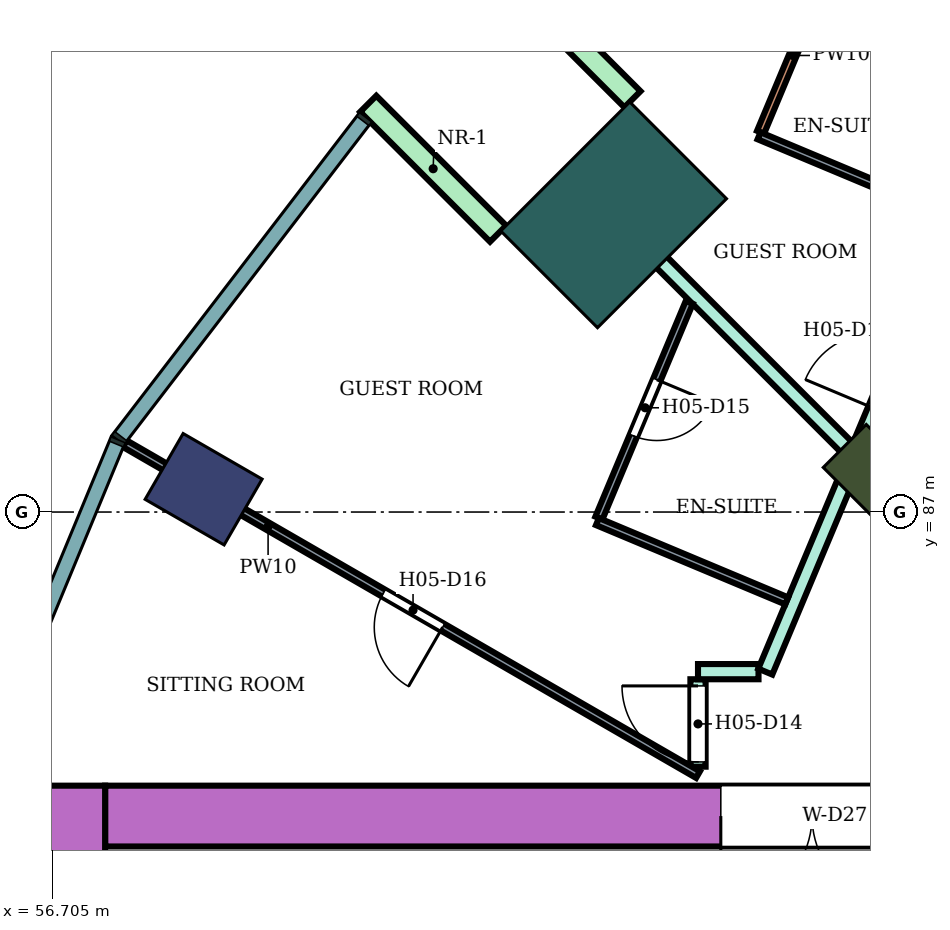
"""IFC4 building model, lengths in metres.
Left out: names, types, materials, properties, quantities, classifications, styles, units other than length and angle.
Written with IfcOpenShell. Run it as: python <this file> out.ifc"""

import sys

from ifc_helpers import new_model, si_unit, direction, frame, frame_2d, origin, origin_2d, place, context, subcontext, project, spatial, rectangle, extrude, element, fill, save


model = new_model("IFC4")
c1 = context("Model", 3, precision=1e-05, world=origin(), true_north=direction((0.0, 1.0)))
c2 = subcontext(c1, "Body", "Model", "MODEL_VIEW")
j1 = project(units=[si_unit("LENGTHUNIT", "METRE"), si_unit("PLANEANGLEUNIT", "RADIAN")], contexts=[c1])
p1 = place(None, origin())
s1 = spatial("IfcSite", under=j1, at=p1, CompositionType="ELEMENT")
p2 = place(p1, origin())
s2 = spatial("IfcBuilding", under=s1, at=p2, CompositionType="ELEMENT")
p3 = place(p2, frame((0.0, 0.0, 86.2)))
s3 = spatial("IfcBuildingStorey", under=s2, at=p3, CompositionType="ELEMENT", Elevation=86.2)
p4 = place(p3, frame((58.696, 87.3, 0.0), z_axis=(0.0, 0.0, 1.0), x_axis=(-0.866025403784, 0.5, 0.0)))
e1 = element("IfcColumn", 1, at=p4, inside=s3, PredefinedType="COLUMN", context=c2, shape_type="SweptSolid", body=[
    extrude(rectangle(XDim=1.2, YDim=1.0, at=origin_2d()), origin(), (0.0, 0.0, 1.0), 3.8),
])
p5 = place(p3, frame((67.555, 87.445, 0.0), z_axis=(0.0, 0.0, 1.0), x_axis=(-0.707106781187, 0.707106781187, 0.0)))
e2 = element("IfcColumn", 2, at=p5, inside=s3, PredefinedType="COLUMN", context=c2, shape_type="SweptSolid", body=[
    extrude(rectangle(XDim=1.2, YDim=0.8, at=origin_2d()), origin(), (0.0, 0.0, 1.0), 3.8),
])
p6 = place(p3, frame((64.09, 90.91, 0.0), z_axis=(0.0, 0.0, 1.0), x_axis=(-0.707106781187, 0.707106781187, 0.0)))
e3 = element("IfcColumn", 3, at=p6, inside=s3, PredefinedType="COLUMN", context=c2, shape_type="SweptSolid", body=[
    extrude(rectangle(XDim=1.8, YDim=2.4, at=origin_2d()), origin(), (0.0, 0.0, 1.0), 3.8),
])
p7 = place(p3, frame((72.1, 83.0, 0.0), z_axis=(0.0, 0.0, 1.0), x_axis=(-1.0, 0.0, 0.0)))
e4 = element("IfcWall", 4, at=p7, inside=s3, PredefinedType="SHEAR", context=c2, shape_type="SweptSolid", body=[
    extrude(rectangle(XDim=14.7, YDim=0.8, at=frame_2d((7.35, 0.0))), origin(), (0.0, 0.0, 1.0), 3.48),
])
p8 = place(p7, frame((4.2, 0.0, 0.0)))
e5 = element("IfcOpeningElement", 5, at=p8, cuts=e4, PredefinedType="OPENING", context=c2, shape_type="SweptSolid", body=[
    extrude(rectangle(XDim=2.4, YDim=2.4, at=frame_2d((1.2, 1.2))), frame((0.0, 0.41, 0.0), z_axis=(0.0, -1.0, 0.0), x_axis=(1.0, 0.0, 0.0)), (0.0, 0.0, 1.0), 0.82),
])
p9 = place(p3, frame((57.0, 83.4, 0.0), z_axis=(0.0, 0.0, 1.0), x_axis=(0.0, -1.0, 0.0)))
e6 = element("IfcWall", 6, at=p9, inside=s3, PredefinedType="SHEAR", context=c2, shape_type="SweptSolid", body=[
    extrude(rectangle(XDim=16.8, YDim=0.8, at=frame_2d((8.4, 0.0))), origin(), (0.0, 0.0, 1.0), 3.48),
])
for number, where, z_axis, x_axis in (
    (7, (64.338, 92.43, 0.0), (0.0, 0.0, 1.0), (-0.707, 0.707, 0.0)),
    (8, (62.57, 90.662, 0.0), (0.0, 0.0, 1.0), (-0.707, 0.707, 0.0)),
):
    element("IfcWall", number, at=place(p3, frame(where, z_axis=z_axis, x_axis=x_axis)), inside=s3, PredefinedType="NOTDEFINED", context=c2, shape_type="SweptSolid", body=[
        extrude(rectangle(XDim=2.416, YDim=0.3, at=frame_2d((1.208, 0.0))), origin(), (0.0, 0.0, 1.0), 3.8),
    ])
p10 = place(p3, frame((63.6, 91.409, 0.0), z_axis=(0.0, 0.0, 1.0), x_axis=(0.70693749829, -0.707276023566, 0.0)))
e9 = element("IfcWall", 9, at=p10, inside=s3, PredefinedType="PARTITIONING", context=c2, shape_type="SweptSolid", body=[
    extrude(rectangle(XDim=5.048, YDim=0.2, at=frame_2d((2.524, 0.0))), origin(), (0.0, 0.0, 1.0), 3.35),
])
p11 = place(p3, frame((65.2, 83.65, 0.0), z_axis=(0.0, 0.0, 1.0), x_axis=(0.0, 1.0, 0.0)))
e10 = element("IfcWall", 10, at=p11, inside=s3, PredefinedType="PARTITIONING", context=c2, shape_type="SweptSolid", body=[
    extrude(rectangle(XDim=1.15, YDim=0.2, at=frame_2d((0.575, 0.0))), origin(), (0.0, 0.0, 1.0), 3.35),
])
p12 = place(p11, frame((0.062, 0.0, 0.0)))
e11 = element("IfcOpeningElement", 11, at=p12, cuts=e10, PredefinedType="OPENING", context=c2, shape_type="SweptSolid", body=[
    extrude(rectangle(XDim=1.0, YDim=2.1, at=frame_2d((0.5, 1.05))), frame((0.0, 0.11, 0.0), z_axis=(0.0, -1.0, 0.0), x_axis=(1.0, 0.0, 0.0)), (0.0, 0.0, 1.0), 0.22),
])
p13 = place(p3, frame((65.2, 84.9, 0.0), z_axis=(0.0, 0.0, 1.0), x_axis=(1.0, 0.0, 0.0)))
e12 = element("IfcWall", 12, at=p13, inside=s3, PredefinedType="PARTITIONING", context=c2, shape_type="SweptSolid", body=[
    extrude(rectangle(XDim=0.796, YDim=0.2, at=frame_2d((0.398, 0.0))), origin(), (0.0, 0.0, 1.0), 3.35),
])
p14 = place(p3, frame((66.085, 84.9, 0.0), z_axis=(0.0, 0.0, 1.0), x_axis=(0.386676248006, 0.922215527536, 0.0)))
e13 = element("IfcWall", 13, at=p14, inside=s3, PredefinedType="PARTITIONING", context=c2, shape_type="SweptSolid", body=[
    extrude(rectangle(XDim=8.5, YDim=0.2, at=frame_2d((4.25, 0.0))), origin(), (0.0, 0.0, 1.0), 3.35),
])
p15 = place(p14, frame((3.748, 0.0, 0.0)))
e14 = element("IfcOpeningElement", 14, at=p15, cuts=e13, PredefinedType="OPENING", context=c2, shape_type="SweptSolid", body=[
    extrude(rectangle(XDim=1.0, YDim=2.1, at=frame_2d((0.5, 1.05))), frame((0.0, 0.11, 0.0), z_axis=(0.0, -1.0, 0.0), x_axis=(1.0, 0.0, 0.0)), (0.0, 0.0, 1.0), 0.22),
])
p16 = place(p3, frame((67.104, 97.343, 0.0), z_axis=(0.0, 0.0, 1.0), x_axis=(0.499799615385, -0.866141064989, 0.0)))
e15 = element("IfcWall", 15, at=p16, inside=s3, PredefinedType="PARTITIONING", context=c2, shape_type="SweptSolid", body=[
    extrude(rectangle(XDim=5.021, YDim=0.2, at=frame_2d((2.511, 0.0))), origin(), (0.0, 0.0, 1.0), 3.35),
])
p17 = place(p3, frame((57.659, 87.899, 0.0), z_axis=(0.0, 0.0, 1.0), x_axis=(0.86602264145, -0.500004784474, 0.0)))
e16 = element("IfcWall", 16, at=p17, inside=s3, PredefinedType="PARTITIONING", context=c2, shape_type="SweptSolid", body=[
    extrude(rectangle(XDim=8.708, YDim=0.1, at=frame_2d((4.354, 0.0))), origin(), (0.0, 0.0, 1.0), 3.35),
])
p18 = place(p17, frame((3.929, 0.0, 0.0)))
e17 = element("IfcOpeningElement", 17, at=p18, cuts=e16, PredefinedType="OPENING", context=c2, shape_type="SweptSolid", body=[
    extrude(rectangle(XDim=0.9, YDim=2.1, at=frame_2d((0.45, 1.05))), frame((0.0, 0.06, 0.0), z_axis=(0.0, -1.0, 0.0), x_axis=(1.0, 0.0, 0.0)), (0.0, 0.0, 1.0), 0.12),
])
p19 = place(p3, frame((63.896, 86.92, 0.0), z_axis=(0.0, 0.0, 1.0), x_axis=(0.386485049699, 0.922295671875, 0.0)))
e18 = element("IfcWall", 18, at=p19, inside=s3, PredefinedType="PARTITIONING", context=c2, shape_type="SweptSolid", body=[
    extrude(rectangle(XDim=3.077, YDim=0.1, at=frame_2d((1.539, 0.0))), origin(), (0.0, 0.0, 1.0), 3.35),
])
p20 = place(p19, frame((1.174, 0.0, 0.0)))
e19 = element("IfcOpeningElement", 19, at=p20, cuts=e18, PredefinedType="OPENING", context=c2, shape_type="SweptSolid", body=[
    extrude(rectangle(XDim=0.8, YDim=2.1, at=frame_2d((0.4, 1.05))), frame((0.0, 0.06, 0.0), z_axis=(0.0, -1.0, 0.0), x_axis=(1.0, 0.0, 0.0)), (0.0, 0.0, 1.0), 0.12),
])
p21 = place(p3, frame((63.877, 86.874, 0.0), z_axis=(0.0, 0.0, 1.0), x_axis=(0.922350337209, -0.386354572188, 0.0)))
e20 = element("IfcWall", 20, at=p21, inside=s3, PredefinedType="PARTITIONING", context=c2, shape_type="SweptSolid", body=[
    extrude(rectangle(XDim=2.7, YDim=0.1, at=frame_2d((1.35, 0.0))), origin(), (0.0, 0.0, 1.0), 3.35),
])
p22 = place(p3, frame((66.023, 91.996, 0.0), z_axis=(0.0, 0.0, 1.0), x_axis=(0.386497426192, 0.922290485447, 0.0)))
e21 = element("IfcWall", 21, at=p22, inside=s3, PredefinedType="PARTITIONING", context=c2, shape_type="SweptSolid", body=[
    extrude(rectangle(XDim=4.383, YDim=0.1, at=frame_2d((2.191, 0.0))), origin(), (0.0, 0.0, 1.0), 2.58),
])
p23 = place(p22, frame((1.841, 0.0, 0.0)))
e22 = element("IfcOpeningElement", 22, at=p23, cuts=e21, PredefinedType="OPENING", context=c2, shape_type="SweptSolid", body=[
    extrude(rectangle(XDim=0.8, YDim=2.1, at=frame_2d((0.4, 1.05))), frame((0.0, 0.06, 0.0), z_axis=(0.0, -1.0, 0.0), x_axis=(1.0, 0.0, 0.0)), (0.0, 0.0, 1.0), 0.12),
])
p24 = place(p3, frame((66.003, 91.95, 0.0), z_axis=(0.0, 0.0, 1.0), x_axis=(0.922350337209, -0.386354572188, 0.0)))
e23 = element("IfcWall", 23, at=p24, inside=s3, PredefinedType="PARTITIONING", context=c2, shape_type="SweptSolid", body=[
    extrude(rectangle(XDim=2.7, YDim=0.1, at=frame_2d((1.35, 0.0))), origin(), (0.0, 0.0, 1.0), 3.35),
])
p25 = place(p12, origin())
e24 = element("IfcDoor", 24, at=p25, inside=s3, OperationType="SINGLE_SWING_RIGHT", PredefinedType="DOOR", context=c2, shape_type="SweptSolid", body=[
    extrude(rectangle(XDim=1.0, YDim=2.1, at=frame_2d((0.5, 1.05))), frame((0.0, 0.025, 0.0), z_axis=(0.0, -1.0, 0.0), x_axis=(1.0, 0.0, 0.0)), (0.0, 0.0, 1.0), 0.05),
])
fill(e11, e24)
p26 = place(p20, frame((0.8, 0.0, 0.0), z_axis=(0.0, 0.0, 1.0), x_axis=(-1.0, 0.0, 0.0)))
e25 = element("IfcDoor", 25, at=p26, inside=s3, OperationType="SINGLE_SWING_LEFT", PredefinedType="DOOR", context=c2, shape_type="SweptSolid", body=[
    extrude(rectangle(XDim=0.8, YDim=2.1, at=frame_2d((0.4, 1.05))), frame((0.0, 0.025, 0.0), z_axis=(0.0, -1.0, 0.0), x_axis=(1.0, 0.0, 0.0)), (0.0, 0.0, 1.0), 0.05),
])
fill(e19, e25)
p27 = place(p18, frame((0.9, 0.0, 0.0), z_axis=(0.0, 0.0, 1.0), x_axis=(-1.0, 0.0, 0.0)))
e26 = element("IfcDoor", 26, at=p27, inside=s3, OperationType="SINGLE_SWING_LEFT", PredefinedType="DOOR", context=c2, shape_type="SweptSolid", body=[
    extrude(rectangle(XDim=0.9, YDim=2.1, at=frame_2d((0.45, 1.05))), frame((0.0, 0.025, 0.0), z_axis=(0.0, -1.0, 0.0), x_axis=(1.0, 0.0, 0.0)), (0.0, 0.0, 1.0), 0.05),
])
fill(e17, e26)
p28 = place(p8, origin())
e27 = element("IfcDoor", 27, at=p28, inside=s3, OperationType="DOUBLE_DOOR_SINGLE_SWING", PredefinedType="DOOR", context=c2, shape_type="SweptSolid", body=[
    extrude(rectangle(XDim=2.4, YDim=2.4, at=frame_2d((1.2, 1.2))), frame((0.0, 0.025, 0.0), z_axis=(0.0, -1.0, 0.0), x_axis=(1.0, 0.0, 0.0)), (0.0, 0.0, 1.0), 0.05),
])
fill(e5, e27)
save(model, sys.argv[1])
